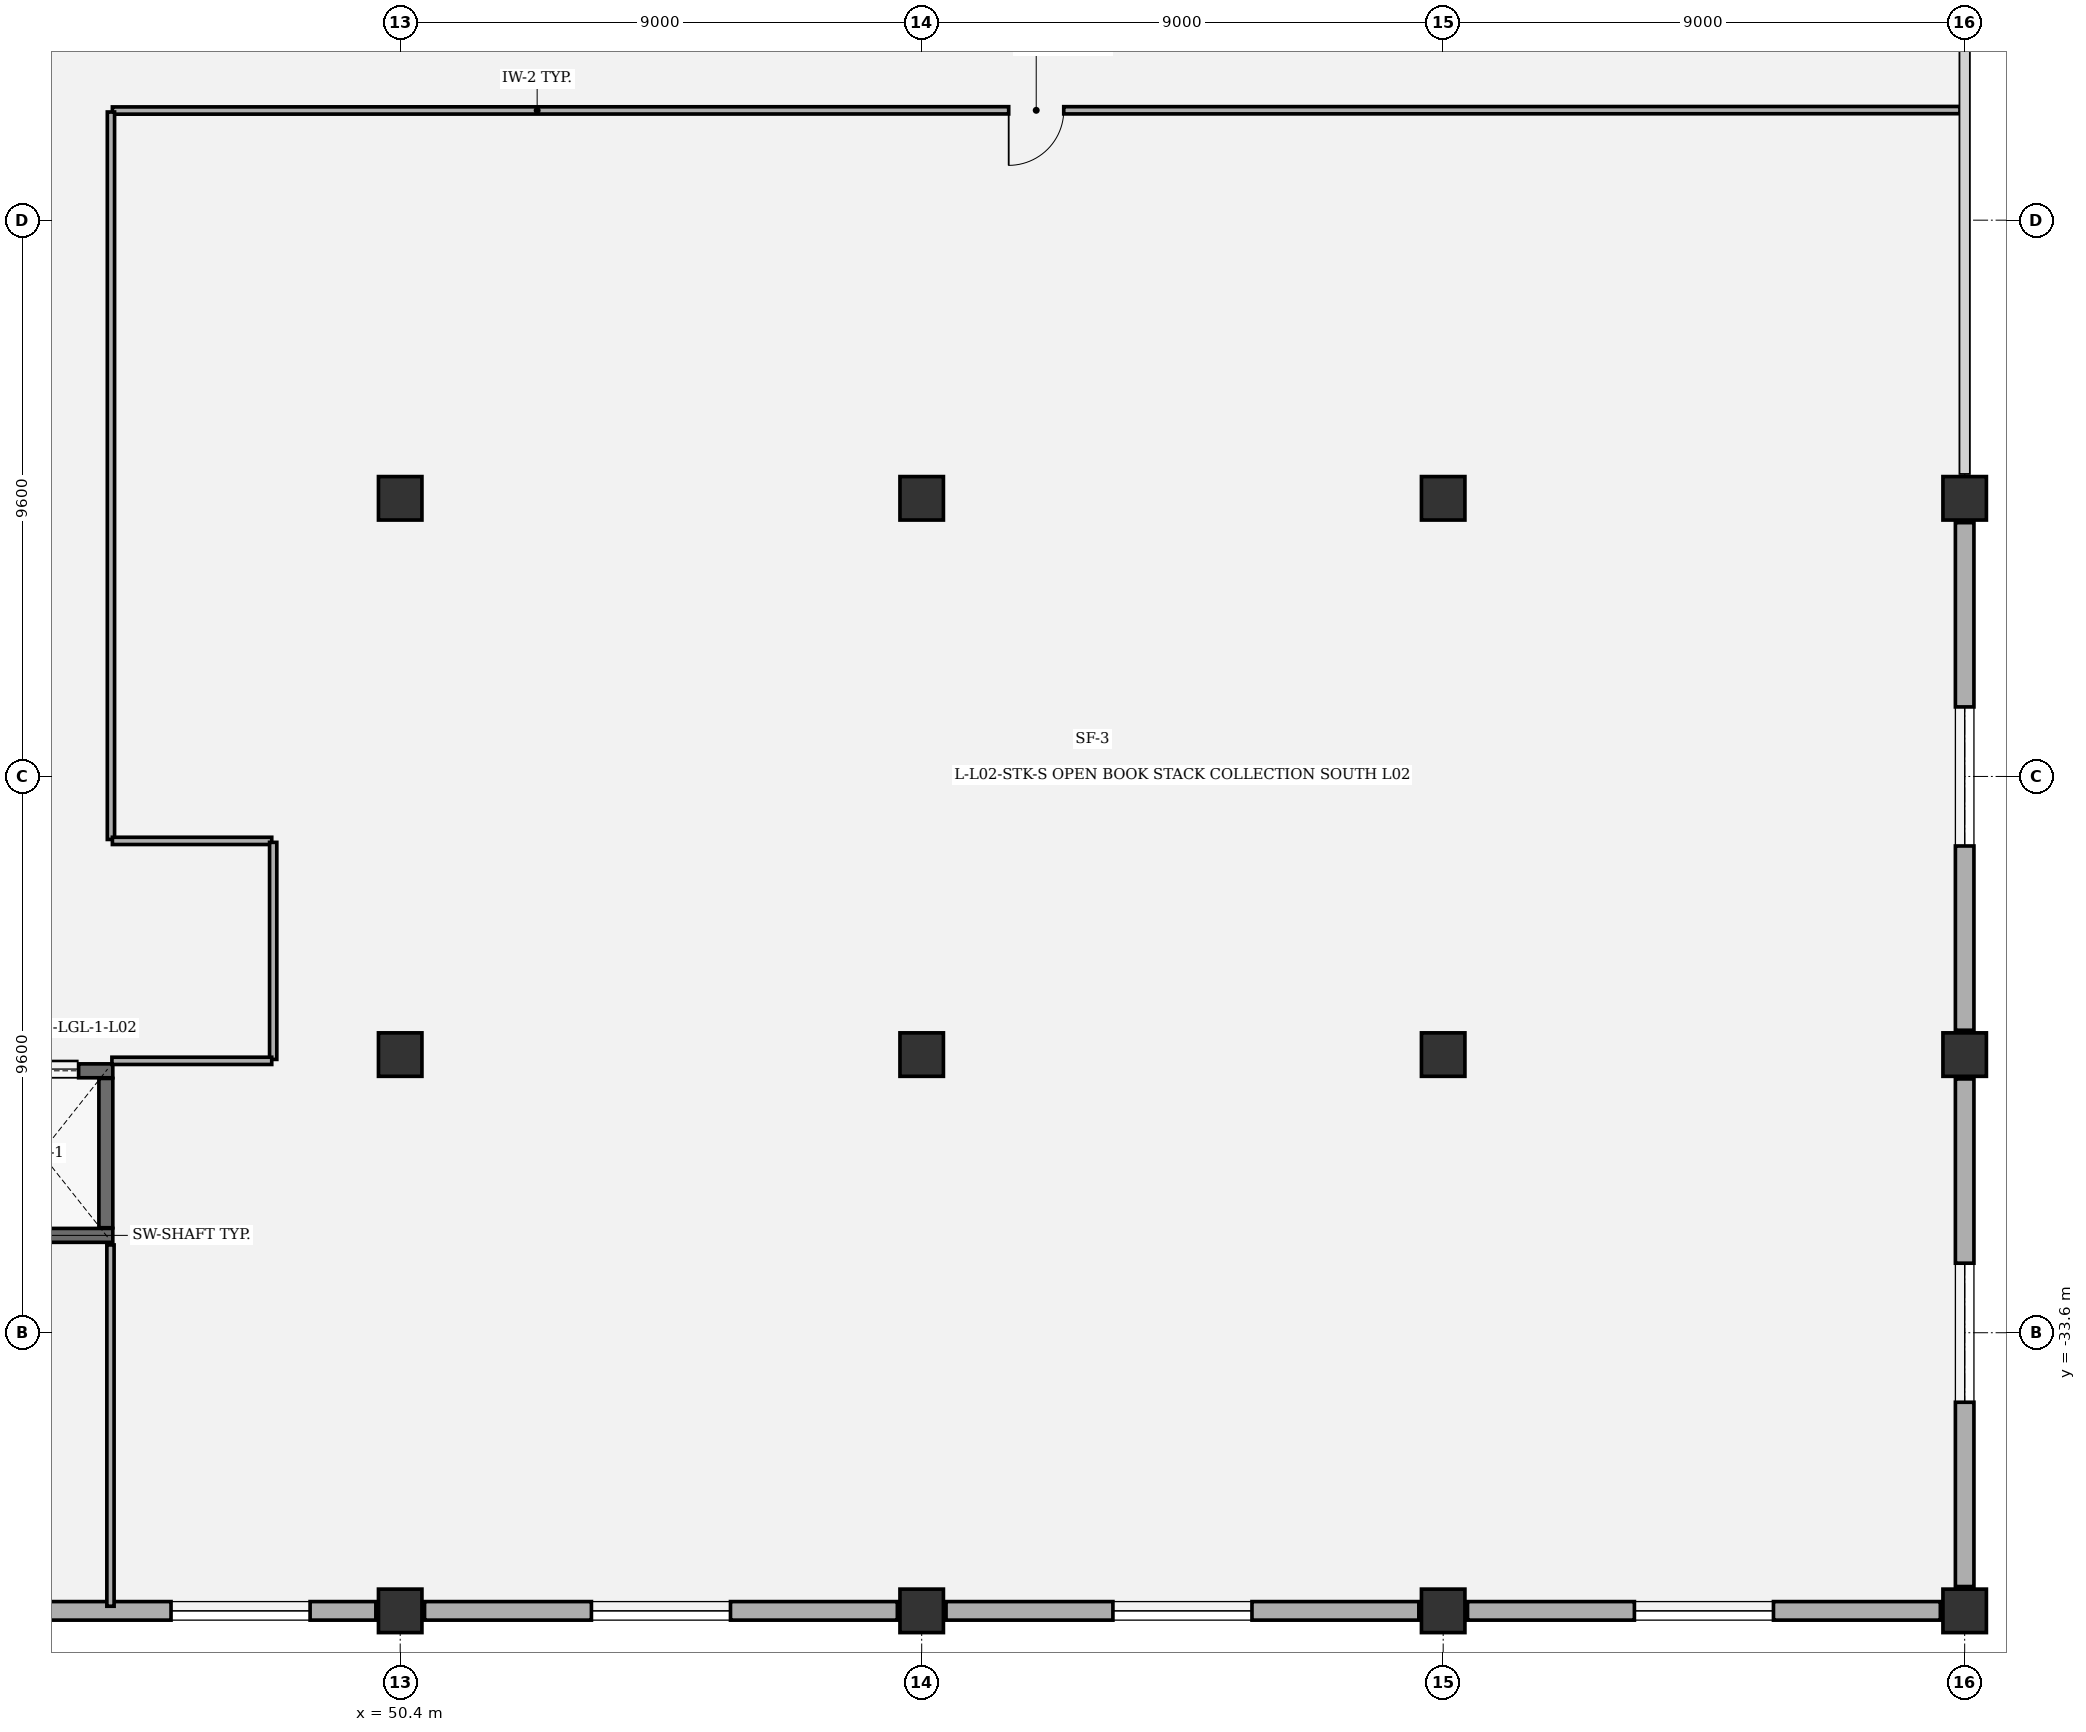
"""IFC4 building model, lengths in metres.
Left out: names, types, materials, properties, quantities, classifications, styles, units other than length and angle.
Written with IfcOpenShell. Run it as: python <this file> out.ifc"""

import sys

from ifc_helpers import new_model, si_unit, direction, frame, frame_2d, origin, origin_2d, place, context, subcontext, project, spatial, rectangle, extrude, element, fill, save


model = new_model("IFC4")
c1 = context("Model", 3, precision=1e-05, world=origin(), true_north=direction((0.0, 1.0)))
c2 = subcontext(c1, "Body", "Model", "MODEL_VIEW")
j1 = project(units=[si_unit("LENGTHUNIT", "METRE"), si_unit("PLANEANGLEUNIT", "RADIAN")], contexts=[c1])
p1 = place(None, origin())
s1 = spatial("IfcSite", under=j1, at=p1, CompositionType="ELEMENT")
p2 = place(p1, origin())
s2 = spatial("IfcBuilding", under=s1, at=p2, CompositionType="ELEMENT")
p3 = place(p2, frame((0.0, 0.0, 12.0)))
s3 = spatial("IfcBuildingStorey", under=s2, at=p3, CompositionType="ELEMENT", Elevation=12.0)
for number, where, z_axis, x_axis in (
    (1, (50.4, -38.4, 0.0), (0.0, 0.0, 1.0), (1.0, 0.0, 0.0)),
    (2, (50.4, -28.8, 0.0), (0.0, 0.0, 1.0), (1.0, 0.0, 0.0)),
    (3, (50.4, -19.2, 0.0), (0.0, 0.0, 1.0), (1.0, 0.0, 0.0)),
    (4, (59.4, -38.4, 0.0), (0.0, 0.0, 1.0), (1.0, 0.0, 0.0)),
    (5, (59.4, -28.8, 0.0), (0.0, 0.0, 1.0), (1.0, 0.0, 0.0)),
    (6, (59.4, -19.2, 0.0), (0.0, 0.0, 1.0), (1.0, 0.0, 0.0)),
    (7, (68.4, -38.4, 0.0), (0.0, 0.0, 1.0), (1.0, 0.0, 0.0)),
    (8, (68.4, -28.8, 0.0), (0.0, 0.0, 1.0), (1.0, 0.0, 0.0)),
    (9, (68.4, -19.2, 0.0), (0.0, 0.0, 1.0), (1.0, 0.0, 0.0)),
    (10, (77.4, -38.4, 0.0), (0.0, 0.0, 1.0), (1.0, 0.0, 0.0)),
    (11, (77.4, -28.8, 0.0), (0.0, 0.0, 1.0), (1.0, 0.0, 0.0)),
    (12, (77.4, -19.2, 0.0), (0.0, 0.0, 1.0), (1.0, 0.0, 0.0)),
):
    element("IfcColumn", number, at=place(p3, frame(where, z_axis=z_axis, x_axis=x_axis)), inside=s3, PredefinedType="COLUMN", context=c2, shape_type="SweptSolid", body=[
        extrude(rectangle(XDim=0.75, YDim=0.75, at=origin_2d()), origin(), (0.0, 0.0, 1.0), 5.0),
    ])
p4 = place(p3, frame((77.4, -29.22, 0.0), z_axis=(0.0, 0.0, 1.0), x_axis=(0.0, -1.0, 0.0)))
e13 = element("IfcWall", 13, at=p4, inside=s3, PredefinedType="SOLIDWALL", context=c2, shape_type="SweptSolid", body=[
    extrude(rectangle(XDim=8.76, YDim=0.32, at=frame_2d((4.38, 0.0))), origin(), (0.0, 0.0, 1.0), 3.937),
])
p5 = place(p4, frame((3.18, 0.0, 0.8)))
e14 = element("IfcOpeningElement", 14, at=p5, cuts=e13, PredefinedType="OPENING", context=c2, shape_type="SweptSolid", body=[
    extrude(rectangle(XDim=2.4, YDim=1.65, at=frame_2d((1.2, 0.825))), frame((0.0, 0.17, 0.0), z_axis=(0.0, -1.0, 0.0), x_axis=(1.0, 0.0, 0.0)), (0.0, 0.0, 1.0), 0.34),
])
p6 = place(p3, frame((77.4, -19.62, 0.0), z_axis=(0.0, 0.0, 1.0), x_axis=(0.0, -1.0, 0.0)))
e15 = element("IfcWall", 15, at=p6, inside=s3, PredefinedType="SOLIDWALL", context=c2, shape_type="SweptSolid", body=[
    extrude(rectangle(XDim=8.76, YDim=0.32, at=frame_2d((4.38, 0.0))), origin(), (0.0, 0.0, 1.0), 3.937),
])
p7 = place(p6, frame((3.18, 0.0, 0.8)))
e16 = element("IfcOpeningElement", 16, at=p7, cuts=e15, PredefinedType="OPENING", context=c2, shape_type="SweptSolid", body=[
    extrude(rectangle(XDim=2.4, YDim=1.65, at=frame_2d((1.2, 0.825))), frame((0.0, 0.17, 0.0), z_axis=(0.0, -1.0, 0.0), x_axis=(1.0, 0.0, 0.0)), (0.0, 0.0, 1.0), 0.34),
])
p8 = place(p3, frame((49.98, -38.4, 0.0), z_axis=(0.0, 0.0, 1.0), x_axis=(-1.0, 0.0, 0.0)))
e17 = element("IfcWall", 17, at=p8, inside=s3, PredefinedType="SOLIDWALL", context=c2, shape_type="SweptSolid", body=[
    extrude(rectangle(XDim=8.16, YDim=0.32, at=frame_2d((4.08, 0.0))), origin(), (0.0, 0.0, 1.0), 3.937),
])
p9 = place(p8, frame((1.135, 0.0, 0.8)))
e18 = element("IfcOpeningElement", 18, at=p9, cuts=e17, PredefinedType="OPENING", context=c2, shape_type="SweptSolid", body=[
    extrude(rectangle(XDim=2.4, YDim=1.65, at=frame_2d((1.2, 0.825))), frame((0.0, 0.17, 0.0), z_axis=(0.0, -1.0, 0.0), x_axis=(1.0, 0.0, 0.0)), (0.0, 0.0, 1.0), 0.34),
])
p10 = place(p3, frame((58.98, -38.4, 0.0), z_axis=(0.0, 0.0, 1.0), x_axis=(-1.0, 0.0, 0.0)))
e19 = element("IfcWall", 19, at=p10, inside=s3, PredefinedType="SOLIDWALL", context=c2, shape_type="SweptSolid", body=[
    extrude(rectangle(XDim=8.16, YDim=0.32, at=frame_2d((4.08, 0.0))), origin(), (0.0, 0.0, 1.0), 3.937),
])
p11 = place(p10, frame((2.88, 0.0, 0.8)))
e20 = element("IfcOpeningElement", 20, at=p11, cuts=e19, PredefinedType="OPENING", context=c2, shape_type="SweptSolid", body=[
    extrude(rectangle(XDim=2.4, YDim=1.65, at=frame_2d((1.2, 0.825))), frame((0.0, 0.17, 0.0), z_axis=(0.0, -1.0, 0.0), x_axis=(1.0, 0.0, 0.0)), (0.0, 0.0, 1.0), 0.34),
])
p12 = place(p3, frame((67.98, -38.4, 0.0), z_axis=(0.0, 0.0, 1.0), x_axis=(-1.0, 0.0, 0.0)))
e21 = element("IfcWall", 21, at=p12, inside=s3, PredefinedType="SOLIDWALL", context=c2, shape_type="SweptSolid", body=[
    extrude(rectangle(XDim=8.16, YDim=0.32, at=frame_2d((4.08, 0.0))), origin(), (0.0, 0.0, 1.0), 3.937),
])
p13 = place(p12, frame((2.88, 0.0, 0.8)))
e22 = element("IfcOpeningElement", 22, at=p13, cuts=e21, PredefinedType="OPENING", context=c2, shape_type="SweptSolid", body=[
    extrude(rectangle(XDim=2.4, YDim=1.65, at=frame_2d((1.2, 0.825))), frame((0.0, 0.17, 0.0), z_axis=(0.0, -1.0, 0.0), x_axis=(1.0, 0.0, 0.0)), (0.0, 0.0, 1.0), 0.34),
])
p14 = place(p3, frame((76.98, -38.4, 0.0), z_axis=(0.0, 0.0, 1.0), x_axis=(-1.0, 0.0, 0.0)))
e23 = element("IfcWall", 23, at=p14, inside=s3, PredefinedType="SOLIDWALL", context=c2, shape_type="SweptSolid", body=[
    extrude(rectangle(XDim=8.16, YDim=0.32, at=frame_2d((4.08, 0.0))), origin(), (0.0, 0.0, 1.0), 3.937),
])
p15 = place(p14, frame((2.88, 0.0, 0.8)))
e24 = element("IfcOpeningElement", 24, at=p15, cuts=e23, PredefinedType="OPENING", context=c2, shape_type="SweptSolid", body=[
    extrude(rectangle(XDim=2.4, YDim=1.65, at=frame_2d((1.2, 0.825))), frame((0.0, 0.17, 0.0), z_axis=(0.0, -1.0, 0.0), x_axis=(1.0, 0.0, 0.0)), (0.0, 0.0, 1.0), 0.34),
])
p16 = place(p3, frame((45.44, -31.92, 0.0), z_axis=(0.0, 0.0, 1.0), x_axis=(-1.0, 0.0, 0.0)))
e25 = element("IfcWall", 25, at=p16, inside=s3, PredefinedType="SHEAR", context=c2, shape_type="SweptSolid", body=[
    extrude(rectangle(XDim=2.48, YDim=0.24, at=frame_2d((1.24, 0.0))), origin(), (0.0, 0.0, 1.0), 4.74),
])
p17 = place(p3, frame((42.96, -29.08, 0.0), z_axis=(0.0, 0.0, 1.0), x_axis=(1.0, 0.0, 0.0)))
e26 = element("IfcWall", 26, at=p17, inside=s3, PredefinedType="SHEAR", context=c2, shape_type="SweptSolid", body=[
    extrude(rectangle(XDim=2.48, YDim=0.24, at=frame_2d((1.24, 0.0))), origin(), (0.0, 0.0, 1.0), 4.74),
])
p18 = place(p17, frame((0.59, 0.0, 0.0)))
e27 = element("IfcOpeningElement", 27, at=p18, cuts=e26, PredefinedType="OPENING", context=c2, shape_type="SweptSolid", body=[
    extrude(rectangle(XDim=1.3, YDim=2.3, at=frame_2d((0.65, 1.15))), frame((0.0, 0.13, 0.0), z_axis=(0.0, -1.0, 0.0), x_axis=(1.0, 0.0, 0.0)), (0.0, 0.0, 1.0), 0.26),
])
p19 = place(p3, frame((45.32, -29.212, 0.0), z_axis=(0.0, 0.0, 1.0), x_axis=(0.0, -1.0, 0.0)))
e28 = element("IfcWall", 28, at=p19, inside=s3, PredefinedType="SHEAR", context=c2, shape_type="SweptSolid", body=[
    extrude(rectangle(XDim=2.576, YDim=0.24, at=frame_2d((1.288, 0.0))), origin(), (0.0, 0.0, 1.0), 4.74),
])
p20 = place(p3, frame((77.32, -12.5, 0.0), z_axis=(0.0, 0.0, 1.0), x_axis=(-0.999999968081, -0.000252662519, 0.0)))
e29 = element("IfcWall", 29, at=p20, inside=s3, PredefinedType="PARTITIONING", context=c2, shape_type="SweptSolid", body=[
    extrude(rectangle(XDim=31.887, YDim=0.125, at=frame_2d((15.943, 0.0))), origin(), (0.0, 0.0, 1.0), 4.74),
])
p21 = place(p20, frame((15.469, 0.0, 0.0)))
e30 = element("IfcOpeningElement", 30, at=p21, cuts=e29, PredefinedType="OPENING", context=c2, shape_type="SweptSolid", body=[
    extrude(rectangle(XDim=0.95, YDim=2.15, at=frame_2d((0.475, 1.075))), frame((0.0, 0.073, 0.0), z_axis=(0.0, -1.0, 0.0), x_axis=(1.0, 0.0, 0.0)), (0.0, 0.0, 1.0), 0.145),
])
p22 = place(p3, frame((45.408, -12.533, 0.0), z_axis=(0.0, 0.0, 1.0), x_axis=(0.0, -1.0, 0.0)))
e31 = element("IfcWall", 31, at=p22, inside=s3, PredefinedType="PARTITIONING", context=c2, shape_type="SweptSolid", body=[
    extrude(rectangle(XDim=12.554, YDim=0.125, at=frame_2d((6.277, 0.0))), origin(), (0.0, 0.0, 1.0), 4.74),
])
p23 = place(p3, frame((48.183, -25.112, 0.0), z_axis=(0.0, 0.0, 1.0), x_axis=(-1.0, 0.0, 0.0)))
e32 = element("IfcWall", 32, at=p23, inside=s3, PredefinedType="PARTITIONING", context=c2, shape_type="SweptSolid", body=[
    extrude(rectangle(XDim=2.75, YDim=0.125, at=frame_2d((1.375, 0.0))), origin(), (0.0, 0.0, 1.0), 4.74),
])
p24 = place(p3, frame((48.208, -25.137, 0.0), z_axis=(0.0, 0.0, 1.0), x_axis=(0.0, -1.0, 0.0)))
e33 = element("IfcWall", 33, at=p24, inside=s3, PredefinedType="PARTITIONING", context=c2, shape_type="SweptSolid", body=[
    extrude(rectangle(XDim=3.746, YDim=0.125, at=frame_2d((1.873, 0.0))), origin(), (0.0, 0.0, 1.0), 4.74),
])
p25 = place(p3, frame((45.425, -28.908, 0.0), z_axis=(0.0, 0.0, 1.0), x_axis=(1.0, 0.0, 0.0)))
e34 = element("IfcWall", 34, at=p25, inside=s3, PredefinedType="PARTITIONING", context=c2, shape_type="SweptSolid", body=[
    extrude(rectangle(XDim=2.758, YDim=0.125, at=frame_2d((1.379, 0.0))), origin(), (0.0, 0.0, 1.0), 4.014),
])
p26 = place(p3, frame((45.4, -32.085, 0.0), z_axis=(0.0, 0.0, 1.0), x_axis=(0.0, -1.0, 0.0)))
e35 = element("IfcWall", 35, at=p26, inside=s3, PredefinedType="PARTITIONING", context=c2, shape_type="SweptSolid", body=[
    extrude(rectangle(XDim=6.235, YDim=0.125, at=frame_2d((3.118, 0.0))), origin(), (0.0, 0.0, 1.0), 4.74),
])
p27 = place(p5, origin())
e36 = element("IfcWindow", 36, at=p27, inside=s3, PartitioningType="SINGLE_PANEL", PredefinedType="WINDOW", context=c2, shape_type="SweptSolid", body=[
    extrude(rectangle(XDim=2.4, YDim=1.65, at=frame_2d((1.2, 0.825))), frame((0.0, 0.03, 0.0), z_axis=(0.0, -1.0, 0.0), x_axis=(1.0, 0.0, 0.0)), (0.0, 0.0, 1.0), 0.06),
])
fill(e14, e36)
p28 = place(p7, origin())
e37 = element("IfcWindow", 37, at=p28, inside=s3, PartitioningType="SINGLE_PANEL", PredefinedType="WINDOW", context=c2, shape_type="SweptSolid", body=[
    extrude(rectangle(XDim=2.4, YDim=1.65, at=frame_2d((1.2, 0.825))), frame((0.0, 0.03, 0.0), z_axis=(0.0, -1.0, 0.0), x_axis=(1.0, 0.0, 0.0)), (0.0, 0.0, 1.0), 0.06),
])
fill(e16, e37)
p29 = place(p9, origin())
e38 = element("IfcWindow", 38, at=p29, inside=s3, PartitioningType="SINGLE_PANEL", PredefinedType="WINDOW", context=c2, shape_type="SweptSolid", body=[
    extrude(rectangle(XDim=2.4, YDim=1.65, at=frame_2d((1.2, 0.825))), frame((0.0, 0.03, 0.0), z_axis=(0.0, -1.0, 0.0), x_axis=(1.0, 0.0, 0.0)), (0.0, 0.0, 1.0), 0.06),
])
fill(e18, e38)
p30 = place(p11, origin())
e39 = element("IfcWindow", 39, at=p30, inside=s3, PartitioningType="SINGLE_PANEL", PredefinedType="WINDOW", context=c2, shape_type="SweptSolid", body=[
    extrude(rectangle(XDim=2.4, YDim=1.65, at=frame_2d((1.2, 0.825))), frame((0.0, 0.03, 0.0), z_axis=(0.0, -1.0, 0.0), x_axis=(1.0, 0.0, 0.0)), (0.0, 0.0, 1.0), 0.06),
])
fill(e20, e39)
p31 = place(p13, origin())
e40 = element("IfcWindow", 40, at=p31, inside=s3, PartitioningType="SINGLE_PANEL", PredefinedType="WINDOW", context=c2, shape_type="SweptSolid", body=[
    extrude(rectangle(XDim=2.4, YDim=1.65, at=frame_2d((1.2, 0.825))), frame((0.0, 0.03, 0.0), z_axis=(0.0, -1.0, 0.0), x_axis=(1.0, 0.0, 0.0)), (0.0, 0.0, 1.0), 0.06),
])
fill(e22, e40)
p32 = place(p15, origin())
e41 = element("IfcWindow", 41, at=p32, inside=s3, PartitioningType="SINGLE_PANEL", PredefinedType="WINDOW", context=c2, shape_type="SweptSolid", body=[
    extrude(rectangle(XDim=2.4, YDim=1.65, at=frame_2d((1.2, 0.825))), frame((0.0, 0.03, 0.0), z_axis=(0.0, -1.0, 0.0), x_axis=(1.0, 0.0, 0.0)), (0.0, 0.0, 1.0), 0.06),
])
fill(e24, e41)
p33 = place(p18, origin())
e42 = element("IfcDoor", 42, at=p33, inside=s3, OperationType="DOUBLE_DOOR_SLIDING", PredefinedType="DOOR", context=c2, shape_type="SweptSolid", body=[
    extrude(rectangle(XDim=1.3, YDim=2.3, at=frame_2d((0.65, 1.15))), frame((0.0, 0.025, 0.0), z_axis=(0.0, -1.0, 0.0), x_axis=(1.0, 0.0, 0.0)), (0.0, 0.0, 1.0), 0.05),
])
fill(e27, e42)
p34 = place(p21, origin())
e43 = element("IfcDoor", 43, at=p34, inside=s3, OperationType="SINGLE_SWING_RIGHT", PredefinedType="DOOR", context=c2, shape_type="SweptSolid", body=[
    extrude(rectangle(XDim=0.95, YDim=2.15, at=frame_2d((0.475, 1.075))), frame((0.0, 0.025, 0.0), z_axis=(0.0, -1.0, 0.0), x_axis=(1.0, 0.0, 0.0)), (0.0, 0.0, 1.0), 0.05),
])
fill(e30, e43)
save(model, sys.argv[1])
